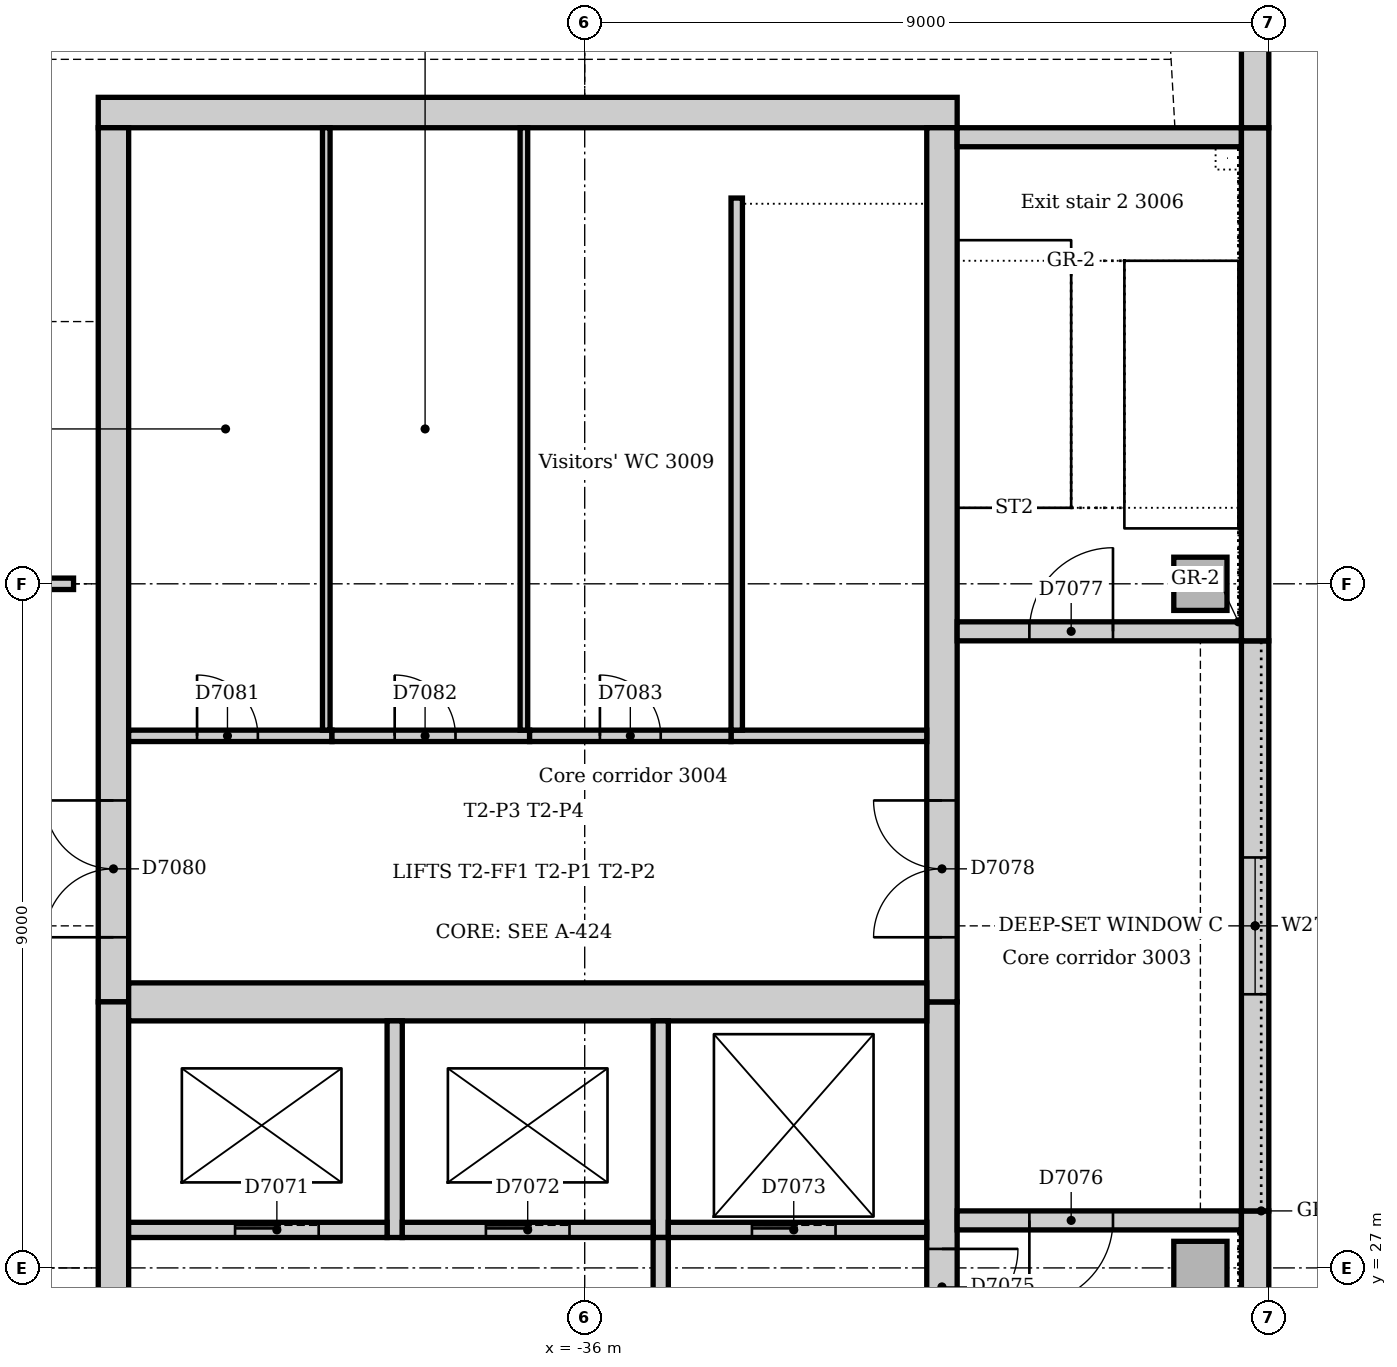
"""IFC4 building model, lengths in metres.
Left out: names, types, materials, properties, quantities, classifications, styles, units other than length and angle.
Written with IfcOpenShell. Run it as: python <this file> out.ifc"""

import sys

from ifc_helpers import new_model, si_unit, direction, frame, frame_2d, origin, origin_2d, place, context, subcontext, project, spatial, rectangle, extrude, element, fill, save


model = new_model("IFC4")
c1 = context("Model", 3, precision=1e-05, world=origin(), true_north=direction((0.0, 1.0)))
c2 = subcontext(c1, "Body", "Model", "MODEL_VIEW")
j1 = project(units=[si_unit("LENGTHUNIT", "METRE"), si_unit("PLANEANGLEUNIT", "RADIAN")], contexts=[c1])
p1 = place(None, origin())
s1 = spatial("IfcSite", under=j1, at=p1, CompositionType="ELEMENT")
p2 = place(p1, origin())
s2 = spatial("IfcBuilding", under=s1, at=p2, CompositionType="ELEMENT")
p3 = place(p2, frame((0.0, 0.0, 128.0)))
s3 = spatial("IfcBuildingStorey", under=s2, at=p3, CompositionType="ELEMENT", Elevation=128.0)
p4 = place(p3, frame((-31.1, 42.2, 0.0), z_axis=(0.0, 0.0, 1.0), x_axis=(-1.0, 0.0, 0.0)))
e1 = element("IfcWall", 1, at=p4, inside=s3, PredefinedType="SOLIDWALL", context=c2, shape_type="SweptSolid", body=[
    extrude(rectangle(XDim=11.3, YDim=0.4, at=frame_2d((5.65, 0.0))), origin(), (0.0, 0.0, 1.0), 4.0),
])
p5 = place(p3, frame((-31.3, 21.0, 0.0), z_axis=(0.0, 0.0, 1.0), x_axis=(0.0, 1.0, 0.0)))
e2 = element("IfcWall", 2, at=p5, inside=s3, PredefinedType="SOLIDWALL", context=c2, shape_type="SweptSolid", body=[
    extrude(rectangle(XDim=9.5, YDim=0.4, at=frame_2d((4.75, 0.0))), origin(), (0.0, 0.0, 1.0), 4.0),
])
p6 = place(p5, frame((5.25, 0.0, 0.0)))
e3 = element("IfcOpeningElement", 3, at=p6, cuts=e2, PredefinedType="OPENING", context=c2, shape_type="SweptSolid", body=[
    extrude(rectangle(XDim=1.0, YDim=2.1, at=frame_2d((0.5, 1.05))), frame((0.0, 0.21, 0.0), z_axis=(0.0, -1.0, 0.0), x_axis=(1.0, 0.0, 0.0)), (0.0, 0.0, 1.0), 0.42),
])
p7 = place(p3, frame((-31.3, 30.5, 0.0), z_axis=(0.0, 0.0, 1.0), x_axis=(0.0, 1.0, 0.0)))
e4 = element("IfcWall", 4, at=p7, inside=s3, PredefinedType="SOLIDWALL", context=c2, shape_type="SweptSolid", body=[
    extrude(rectangle(XDim=11.5, YDim=0.4, at=frame_2d((5.75, 0.0))), origin(), (0.0, 0.0, 1.0), 4.0),
])
p8 = place(p7, frame((0.85, 0.0, 0.0)))
e5 = element("IfcOpeningElement", 5, at=p8, cuts=e4, PredefinedType="OPENING", context=c2, shape_type="SweptSolid", body=[
    extrude(rectangle(XDim=1.8, YDim=2.1, at=frame_2d((0.9, 1.05))), frame((0.0, 0.21, 0.0), z_axis=(0.0, -1.0, 0.0), x_axis=(1.0, 0.0, 0.0)), (0.0, 0.0, 1.0), 0.42),
])
p9 = place(p3, frame((-42.2, 42.0, 0.0), z_axis=(0.0, 0.0, 1.0), x_axis=(0.0, -1.0, 0.0)))
e6 = element("IfcWall", 6, at=p9, inside=s3, PredefinedType="SOLIDWALL", context=c2, shape_type="SweptSolid", body=[
    extrude(rectangle(XDim=11.5, YDim=0.4, at=frame_2d((5.75, 0.0))), origin(), (0.0, 0.0, 1.0), 4.0),
])
p10 = place(p9, frame((8.85, 0.0, 0.0)))
e7 = element("IfcOpeningElement", 7, at=p10, cuts=e6, PredefinedType="OPENING", context=c2, shape_type="SweptSolid", body=[
    extrude(rectangle(XDim=1.8, YDim=2.1, at=frame_2d((0.9, 1.05))), frame((0.0, 0.21, 0.0), z_axis=(0.0, -1.0, 0.0), x_axis=(1.0, 0.0, 0.0)), (0.0, 0.0, 1.0), 0.42),
])
p11 = place(p3, frame((-42.2, 30.5, 0.0), z_axis=(0.0, 0.0, 1.0), x_axis=(0.0, -1.0, 0.0)))
e8 = element("IfcWall", 8, at=p11, inside=s3, PredefinedType="SOLIDWALL", context=c2, shape_type="SweptSolid", body=[
    extrude(rectangle(XDim=9.5, YDim=0.4, at=frame_2d((4.75, 0.0))), origin(), (0.0, 0.0, 1.0), 4.0),
])
p12 = place(p11, frame((3.85, 0.0, 0.0)))
e9 = element("IfcOpeningElement", 9, at=p12, cuts=e8, PredefinedType="OPENING", context=c2, shape_type="SweptSolid", body=[
    extrude(rectangle(XDim=1.8, YDim=2.1, at=frame_2d((0.9, 1.05))), frame((0.0, 0.21, 0.0), z_axis=(0.0, -1.0, 0.0), x_axis=(1.0, 0.0, 0.0)), (0.0, 0.0, 1.0), 0.42),
])
p13 = place(p3, frame((-42.0, 30.5, 0.0), z_axis=(0.0, 0.0, 1.0), x_axis=(1.0, 0.0, 0.0)))
e10 = element("IfcWall", 10, at=p13, inside=s3, PredefinedType="SOLIDWALL", context=c2, shape_type="SweptSolid", body=[
    extrude(rectangle(XDim=10.5, YDim=0.5, at=frame_2d((5.25, 0.0))), origin(), (0.0, 0.0, 1.0), 4.0),
])
p14 = place(p3, frame((-27.36, 27.625, 0.0), z_axis=(0.0, 0.0, 1.0), x_axis=(-1.0, 0.0, 0.0)))
e11 = element("IfcWall", 11, at=p14, inside=s3, PredefinedType="SOLIDWALL", context=c2, shape_type="SweptSolid", body=[
    extrude(rectangle(XDim=3.74, YDim=0.25, at=frame_2d((1.87, 0.0))), origin(), (0.0, 0.0, 1.0), 4.0),
])
p15 = place(p14, frame((1.69, 0.0, 0.0)))
e12 = element("IfcOpeningElement", 12, at=p15, cuts=e11, PredefinedType="OPENING", context=c2, shape_type="SweptSolid", body=[
    extrude(rectangle(XDim=1.1, YDim=2.1, at=frame_2d((0.55, 1.05))), frame((0.0, 0.135, 0.0), z_axis=(0.0, -1.0, 0.0), x_axis=(1.0, 0.0, 0.0)), (0.0, 0.0, 1.0), 0.27),
])
p16 = place(p3, frame((-31.1, 35.375, 0.0), z_axis=(0.0, 0.0, 1.0), x_axis=(1.0, 0.0, 0.0)))
e13 = element("IfcWall", 13, at=p16, inside=s3, PredefinedType="SOLIDWALL", context=c2, shape_type="SweptSolid", body=[
    extrude(rectangle(XDim=3.74, YDim=0.25, at=frame_2d((1.87, 0.0))), origin(), (0.0, 0.0, 1.0), 4.0),
])
p17 = place(p16, frame((0.95, 0.0, 0.0)))
e14 = element("IfcOpeningElement", 14, at=p17, cuts=e13, PredefinedType="OPENING", context=c2, shape_type="SweptSolid", body=[
    extrude(rectangle(XDim=1.1, YDim=2.1, at=frame_2d((0.55, 1.05))), frame((0.0, 0.135, 0.0), z_axis=(0.0, -1.0, 0.0), x_axis=(1.0, 0.0, 0.0)), (0.0, 0.0, 1.0), 0.27),
])
p18 = place(p3, frame((-27.36, 41.875, 0.0), z_axis=(0.0, 0.0, 1.0), x_axis=(-1.0, 0.0, 0.0)))
e15 = element("IfcWall", 15, at=p18, inside=s3, PredefinedType="SOLIDWALL", context=c2, shape_type="SweptSolid", body=[
    extrude(rectangle(XDim=3.74, YDim=0.25, at=frame_2d((1.87, 0.0))), origin(), (0.0, 0.0, 1.0), 4.0),
])
for number, where, z_axis, x_axis in (
    (16, (-27.9, 27.0, 0.0), (0.0, 0.0, 1.0), (1.0, 0.0, 0.0)),
    (17, (-27.9, 36.0, 0.0), (0.0, 0.0, 1.0), (1.0, 0.0, 0.0)),
):
    element("IfcColumn", number, at=place(p3, frame(where, z_axis=z_axis, x_axis=x_axis)), inside=s3, PredefinedType="COLUMN", context=c2, shape_type="SweptSolid", body=[
        extrude(rectangle(XDim=0.7, YDim=0.7, at=origin_2d()), origin(), (0.0, 0.0, 1.0), 4.0),
    ])
p19 = place(p3, frame((-27.18, 21.0, 0.0), z_axis=(0.0, 0.0, 1.0), x_axis=(0.0, 1.0, 0.0)))
e18 = element("IfcWall", 18, at=p19, inside=s3, PredefinedType="STANDARD", context=c2, shape_type="SweptSolid", body=[
    extrude(rectangle(XDim=6.75, YDim=0.36, at=frame_2d((3.375, 0.0))), origin(), (0.0, 0.0, 1.0), 3.85),
])
p20 = place(p3, frame((-27.18, 27.75, 0.0), z_axis=(0.0, 0.0, 1.0), x_axis=(0.0, 1.0, 0.0)))
e19 = element("IfcWall", 19, at=p20, inside=s3, PredefinedType="STANDARD", context=c2, shape_type="SweptSolid", body=[
    extrude(rectangle(XDim=7.5, YDim=0.36, at=frame_2d((3.75, 0.0))), origin(), (0.0, 0.0, 1.0), 3.85),
])
p21 = place(p20, frame((2.85, 0.0, 1.2)))
e20 = element("IfcOpeningElement", 20, at=p21, cuts=e19, PredefinedType="OPENING", context=c2, shape_type="SweptSolid", body=[
    extrude(rectangle(XDim=1.8, YDim=1.2, at=frame_2d((0.9, 0.6))), frame((0.0, 0.19, 0.0), z_axis=(0.0, -1.0, 0.0), x_axis=(1.0, 0.0, 0.0)), (0.0, 0.0, 1.0), 0.38),
])
p22 = place(p3, frame((-27.18, 35.25, 0.0), z_axis=(0.0, 0.0, 1.0), x_axis=(0.0, 1.0, 0.0)))
e21 = element("IfcWall", 21, at=p22, inside=s3, PredefinedType="STANDARD", context=c2, shape_type="SweptSolid", body=[
    extrude(rectangle(XDim=6.75, YDim=0.36, at=frame_2d((3.375, 0.0))), origin(), (0.0, 0.0, 1.0), 3.85),
])
p23 = place(p3, frame((-27.18, 42.0, 0.0), z_axis=(0.0, 0.0, 1.0), x_axis=(0.0, 1.0, 0.0)))
e22 = element("IfcWall", 22, at=p23, inside=s3, PredefinedType="STANDARD", context=c2, shape_type="SweptSolid", body=[
    extrude(rectangle(XDim=3.257, YDim=0.36, at=frame_2d((1.629, 0.0))), origin(), (0.0, 0.0, 1.0), 3.85),
])
p24 = place(p3, frame((-38.5, 27.4, 0.0), z_axis=(0.0, 0.0, 1.0), x_axis=(0.0, 1.0, 0.0)))
e23 = element("IfcWall", 23, at=p24, inside=s3, PredefinedType="SOLIDWALL", context=c2, shape_type="SweptSolid", body=[
    extrude(rectangle(XDim=2.85, YDim=0.2, at=frame_2d((1.425, 0.0))), origin(), (0.0, 0.0, 1.0), 4.0),
])
p25 = place(p3, frame((-42.0, 27.5, 0.0), z_axis=(0.0, 0.0, 1.0), x_axis=(1.0, 0.0, 0.0)))
e24 = element("IfcWall", 24, at=p25, inside=s3, PredefinedType="SOLIDWALL", context=c2, shape_type="SweptSolid", body=[
    extrude(rectangle(XDim=3.4, YDim=0.2, at=frame_2d((1.7, 0.0))), origin(), (0.0, 0.0, 1.0), 4.0),
])
p26 = place(p25, frame((1.4, 0.0, 0.0)))
e25 = element("IfcOpeningElement", 25, at=p26, cuts=e24, PredefinedType="OPENING", context=c2, shape_type="SweptSolid", body=[
    extrude(rectangle(XDim=1.1, YDim=2.1, at=frame_2d((0.55, 1.05))), frame((0.0, 0.11, 0.0), z_axis=(0.0, -1.0, 0.0), x_axis=(1.0, 0.0, 0.0)), (0.0, 0.0, 1.0), 0.22),
])
p27 = place(p3, frame((-35.0, 27.4, 0.0), z_axis=(0.0, 0.0, 1.0), x_axis=(0.0, 1.0, 0.0)))
e26 = element("IfcWall", 26, at=p27, inside=s3, PredefinedType="SOLIDWALL", context=c2, shape_type="SweptSolid", body=[
    extrude(rectangle(XDim=2.85, YDim=0.2, at=frame_2d((1.425, 0.0))), origin(), (0.0, 0.0, 1.0), 4.0),
])
p28 = place(p3, frame((-38.4, 27.5, 0.0), z_axis=(0.0, 0.0, 1.0), x_axis=(1.0, 0.0, 0.0)))
e27 = element("IfcWall", 27, at=p28, inside=s3, PredefinedType="SOLIDWALL", context=c2, shape_type="SweptSolid", body=[
    extrude(rectangle(XDim=3.3, YDim=0.2, at=frame_2d((1.65, 0.0))), origin(), (0.0, 0.0, 1.0), 4.0),
])
p29 = place(p28, frame((1.1, 0.0, 0.0)))
e28 = element("IfcOpeningElement", 28, at=p29, cuts=e27, PredefinedType="OPENING", context=c2, shape_type="SweptSolid", body=[
    extrude(rectangle(XDim=1.1, YDim=2.1, at=frame_2d((0.55, 1.05))), frame((0.0, 0.11, 0.0), z_axis=(0.0, -1.0, 0.0), x_axis=(1.0, 0.0, 0.0)), (0.0, 0.0, 1.0), 0.22),
])
p30 = place(p3, frame((-34.9, 27.5, 0.0), z_axis=(0.0, 0.0, 1.0), x_axis=(1.0, 0.0, 0.0)))
e29 = element("IfcWall", 29, at=p30, inside=s3, PredefinedType="SOLIDWALL", context=c2, shape_type="SweptSolid", body=[
    extrude(rectangle(XDim=3.4, YDim=0.2, at=frame_2d((1.7, 0.0))), origin(), (0.0, 0.0, 1.0), 4.0),
])
p31 = place(p30, frame((1.1, 0.0, 0.0)))
e30 = element("IfcOpeningElement", 30, at=p31, cuts=e29, PredefinedType="OPENING", context=c2, shape_type="SweptSolid", body=[
    extrude(rectangle(XDim=1.1, YDim=2.1, at=frame_2d((0.55, 1.05))), frame((0.0, 0.11, 0.0), z_axis=(0.0, -1.0, 0.0), x_axis=(1.0, 0.0, 0.0)), (0.0, 0.0, 1.0), 0.22),
])
p32 = place(p3, frame((-35.0, 24.1, 0.0), z_axis=(0.0, 0.0, 1.0), x_axis=(0.0, 1.0, 0.0)))
e31 = element("IfcWall", 31, at=p32, inside=s3, PredefinedType="SOLIDWALL", context=c2, shape_type="SweptSolid", body=[
    extrude(rectangle(XDim=3.3, YDim=0.2, at=frame_2d((1.65, 0.0))), origin(), (0.0, 0.0, 1.0), 4.0),
])
p33 = place(p32, frame((1.15, 0.0, 0.0)))
e32 = element("IfcOpeningElement", 32, at=p33, cuts=e31, PredefinedType="OPENING", context=c2, shape_type="SweptSolid", body=[
    extrude(rectangle(XDim=1.0, YDim=2.1, at=frame_2d((0.5, 1.05))), frame((0.0, 0.11, 0.0), z_axis=(0.0, -1.0, 0.0), x_axis=(1.0, 0.0, 0.0)), (0.0, 0.0, 1.0), 0.22),
])
p34 = place(p3, frame((-34.075, 34.0, 0.0), z_axis=(0.0, 0.0, 1.0), x_axis=(1.0, 0.0, 0.0)))
e33 = element("IfcWall", 33, at=p34, inside=s3, PredefinedType="SOLIDWALL", context=c2, shape_type="SweptSolid", body=[
    extrude(rectangle(XDim=2.575, YDim=0.15, at=frame_2d((1.288, 0.0))), origin(), (0.0, 0.0, 1.0), 4.0),
])
p35 = place(p3, frame((-34.0, 41.075, 0.0), z_axis=(0.0, 0.0, 1.0), x_axis=(0.0, -1.0, 0.0)))
e34 = element("IfcWall", 34, at=p35, inside=s3, PredefinedType="SOLIDWALL", context=c2, shape_type="SweptSolid", body=[
    extrude(rectangle(XDim=7.0, YDim=0.15, at=frame_2d((3.5, 0.0))), origin(), (0.0, 0.0, 1.0), 4.0),
])
p36 = place(p3, frame((-39.325, 34.0, 0.0), z_axis=(0.0, 0.0, 1.0), x_axis=(-1.0, 0.0, 0.0)))
e35 = element("IfcWall", 35, at=p36, inside=s3, PredefinedType="PARTITIONING", context=c2, shape_type="SweptSolid", body=[
    extrude(rectangle(XDim=2.675, YDim=0.15, at=frame_2d((1.337, 0.0))), origin(), (0.0, 0.0, 1.0), 3.85),
])
p37 = place(p36, frame((0.975, 0.0, 0.0)))
e36 = element("IfcOpeningElement", 36, at=p37, cuts=e35, PredefinedType="OPENING", context=c2, shape_type="SweptSolid", body=[
    extrude(rectangle(XDim=0.8, YDim=2.1, at=frame_2d((0.4, 1.05))), frame((0.0, 0.085, 0.0), z_axis=(0.0, -1.0, 0.0), x_axis=(1.0, 0.0, 0.0)), (0.0, 0.0, 1.0), 0.17),
])
p38 = place(p3, frame((-36.725, 34.0, 0.0), z_axis=(0.0, 0.0, 1.0), x_axis=(-1.0, 0.0, 0.0)))
e37 = element("IfcWall", 37, at=p38, inside=s3, PredefinedType="PARTITIONING", context=c2, shape_type="SweptSolid", body=[
    extrude(rectangle(XDim=2.6, YDim=0.15, at=frame_2d((1.3, 0.0))), origin(), (0.0, 0.0, 1.0), 3.85),
])
p39 = place(p38, frame((0.975, 0.0, 0.0)))
e38 = element("IfcOpeningElement", 38, at=p39, cuts=e37, PredefinedType="OPENING", context=c2, shape_type="SweptSolid", body=[
    extrude(rectangle(XDim=0.8, YDim=2.1, at=frame_2d((0.4, 1.05))), frame((0.0, 0.085, 0.0), z_axis=(0.0, -1.0, 0.0), x_axis=(1.0, 0.0, 0.0)), (0.0, 0.0, 1.0), 0.17),
])
p40 = place(p3, frame((-34.075, 34.0, 0.0), z_axis=(0.0, 0.0, 1.0), x_axis=(-1.0, 0.0, 0.0)))
e39 = element("IfcWall", 39, at=p40, inside=s3, PredefinedType="PARTITIONING", context=c2, shape_type="SweptSolid", body=[
    extrude(rectangle(XDim=2.65, YDim=0.15, at=frame_2d((1.325, 0.0))), origin(), (0.0, 0.0, 1.0), 3.85),
])
p41 = place(p40, frame((0.925, 0.0, 0.0)))
e40 = element("IfcOpeningElement", 40, at=p41, cuts=e39, PredefinedType="OPENING", context=c2, shape_type="SweptSolid", body=[
    extrude(rectangle(XDim=0.8, YDim=2.1, at=frame_2d((0.4, 1.05))), frame((0.0, 0.085, 0.0), z_axis=(0.0, -1.0, 0.0), x_axis=(1.0, 0.0, 0.0)), (0.0, 0.0, 1.0), 0.17),
])
for number, where, z_axis, x_axis in (
    (41, (-39.4, 34.075, 0.0), (0.0, 0.0, 1.0), (0.0, 1.0, 0.0)),
    (42, (-36.8, 34.075, 0.0), (0.0, 0.0, 1.0), (0.0, 1.0, 0.0)),
):
    element("IfcWall", number, at=place(p3, frame(where, z_axis=z_axis, x_axis=x_axis)), inside=s3, PredefinedType="PARTITIONING", context=c2, shape_type="SweptSolid", body=[
        extrude(rectangle(XDim=7.925, YDim=0.1, at=frame_2d((3.962, 0.0))), origin(), (0.0, 0.0, 1.0), 3.85),
    ])
p42 = place(p3, frame((-44.7, 36.0, 0.0), z_axis=(0.0, 0.0, 1.0), x_axis=(1.0, 0.0, 0.0)))
e43 = element("IfcWall", 43, at=p42, inside=s3, PredefinedType="PARTITIONING", context=c2, shape_type="SweptSolid", body=[
    extrude(rectangle(XDim=1.975, YDim=0.15, at=frame_2d((0.988, 0.0))), origin(), (0.0, 0.0, 1.0), 3.602),
])
p43 = place(p42, frame((0.55, 0.0, 0.0)))
e44 = element("IfcOpeningElement", 44, at=p43, cuts=e43, PredefinedType="OPENING", context=c2, shape_type="SweptSolid", body=[
    extrude(rectangle(XDim=0.9, YDim=2.1, at=frame_2d((0.45, 1.05))), frame((0.0, 0.085, 0.0), z_axis=(0.0, -1.0, 0.0), x_axis=(1.0, 0.0, 0.0)), (0.0, 0.0, 1.0), 0.17),
])
p44 = place(p21, origin())
e45 = element("IfcWindow", 45, at=p44, inside=s3, PartitioningType="SINGLE_PANEL", PredefinedType="WINDOW", context=c2, shape_type="SweptSolid", body=[
    extrude(rectangle(XDim=1.8, YDim=1.2, at=frame_2d((0.9, 0.6))), frame((0.0, 0.13, 0.0), z_axis=(0.0, -1.0, 0.0), x_axis=(1.0, 0.0, 0.0)), (0.0, 0.0, 1.0), 0.06),
])
fill(e20, e45)
p45 = place(p26, origin())
e46 = element("IfcDoor", 46, at=p45, inside=s3, OperationType="SLIDING_TO_LEFT", PredefinedType="DOOR", context=c2, shape_type="SweptSolid", body=[
    extrude(rectangle(XDim=1.1, YDim=2.1, at=frame_2d((0.55, 1.05))), frame((0.0, 0.025, 0.0), z_axis=(0.0, -1.0, 0.0), x_axis=(1.0, 0.0, 0.0)), (0.0, 0.0, 1.0), 0.05),
])
fill(e25, e46)
p46 = place(p29, origin())
e47 = element("IfcDoor", 47, at=p46, inside=s3, OperationType="SLIDING_TO_LEFT", PredefinedType="DOOR", context=c2, shape_type="SweptSolid", body=[
    extrude(rectangle(XDim=1.1, YDim=2.1, at=frame_2d((0.55, 1.05))), frame((0.0, 0.025, 0.0), z_axis=(0.0, -1.0, 0.0), x_axis=(1.0, 0.0, 0.0)), (0.0, 0.0, 1.0), 0.05),
])
fill(e28, e47)
p47 = place(p31, origin())
e48 = element("IfcDoor", 48, at=p47, inside=s3, OperationType="SLIDING_TO_LEFT", PredefinedType="DOOR", context=c2, shape_type="SweptSolid", body=[
    extrude(rectangle(XDim=1.1, YDim=2.1, at=frame_2d((0.55, 1.05))), frame((0.0, 0.025, 0.0), z_axis=(0.0, -1.0, 0.0), x_axis=(1.0, 0.0, 0.0)), (0.0, 0.0, 1.0), 0.05),
])
fill(e30, e48)
p48 = place(p6, frame((1.0, 0.0, 0.0), z_axis=(0.0, 0.0, 1.0), x_axis=(-1.0, 0.0, 0.0)))
e49 = element("IfcDoor", 49, at=p48, inside=s3, OperationType="SINGLE_SWING_LEFT", PredefinedType="DOOR", context=c2, shape_type="SweptSolid", body=[
    extrude(rectangle(XDim=1.0, YDim=2.1, at=frame_2d((0.5, 1.05))), frame((0.0, 0.025, 0.0), z_axis=(0.0, -1.0, 0.0), x_axis=(1.0, 0.0, 0.0)), (0.0, 0.0, 1.0), 0.05),
])
fill(e3, e49)
p49 = place(p15, origin())
e50 = element("IfcDoor", 50, at=p49, inside=s3, OperationType="SINGLE_SWING_RIGHT", PredefinedType="DOOR", context=c2, shape_type="SweptSolid", body=[
    extrude(rectangle(XDim=1.1, YDim=2.1, at=frame_2d((0.55, 1.05))), frame((0.0, 0.025, 0.0), z_axis=(0.0, -1.0, 0.0), x_axis=(1.0, 0.0, 0.0)), (0.0, 0.0, 1.0), 0.05),
])
fill(e12, e50)
p50 = place(p17, origin())
e51 = element("IfcDoor", 51, at=p50, inside=s3, OperationType="SINGLE_SWING_RIGHT", PredefinedType="DOOR", context=c2, shape_type="SweptSolid", body=[
    extrude(rectangle(XDim=1.1, YDim=2.1, at=frame_2d((0.55, 1.05))), frame((0.0, 0.025, 0.0), z_axis=(0.0, -1.0, 0.0), x_axis=(1.0, 0.0, 0.0)), (0.0, 0.0, 1.0), 0.05),
])
fill(e14, e51)
p51 = place(p8, origin())
e52 = element("IfcDoor", 52, at=p51, inside=s3, OperationType="DOUBLE_DOOR_SINGLE_SWING", PredefinedType="DOOR", context=c2, shape_type="SweptSolid", body=[
    extrude(rectangle(XDim=1.8, YDim=2.1, at=frame_2d((0.9, 1.05))), frame((0.0, 0.025, 0.0), z_axis=(0.0, -1.0, 0.0), x_axis=(1.0, 0.0, 0.0)), (0.0, 0.0, 1.0), 0.05),
])
fill(e5, e52)
p52 = place(p10, frame((1.8, 0.0, 0.0), z_axis=(0.0, 0.0, 1.0), x_axis=(-1.0, 0.0, 0.0)))
e53 = element("IfcDoor", 53, at=p52, inside=s3, OperationType="DOUBLE_DOOR_SINGLE_SWING", PredefinedType="DOOR", context=c2, shape_type="SweptSolid", body=[
    extrude(rectangle(XDim=1.8, YDim=2.1, at=frame_2d((0.9, 1.05))), frame((0.0, 0.025, 0.0), z_axis=(0.0, -1.0, 0.0), x_axis=(1.0, 0.0, 0.0)), (0.0, 0.0, 1.0), 0.05),
])
fill(e7, e53)
p53 = place(p37, frame((0.8, 0.0, 0.0), z_axis=(0.0, 0.0, 1.0), x_axis=(-1.0, 0.0, 0.0)))
e54 = element("IfcDoor", 54, at=p53, inside=s3, OperationType="SINGLE_SWING_LEFT", PredefinedType="DOOR", context=c2, shape_type="SweptSolid", body=[
    extrude(rectangle(XDim=0.8, YDim=2.1, at=frame_2d((0.4, 1.05))), frame((0.0, 0.025, 0.0), z_axis=(0.0, -1.0, 0.0), x_axis=(1.0, 0.0, 0.0)), (0.0, 0.0, 1.0), 0.05),
])
fill(e36, e54)
p54 = place(p39, frame((0.8, 0.0, 0.0), z_axis=(0.0, 0.0, 1.0), x_axis=(-1.0, 0.0, 0.0)))
e55 = element("IfcDoor", 55, at=p54, inside=s3, OperationType="SINGLE_SWING_LEFT", PredefinedType="DOOR", context=c2, shape_type="SweptSolid", body=[
    extrude(rectangle(XDim=0.8, YDim=2.1, at=frame_2d((0.4, 1.05))), frame((0.0, 0.025, 0.0), z_axis=(0.0, -1.0, 0.0), x_axis=(1.0, 0.0, 0.0)), (0.0, 0.0, 1.0), 0.05),
])
fill(e38, e55)
p55 = place(p41, frame((0.8, 0.0, 0.0), z_axis=(0.0, 0.0, 1.0), x_axis=(-1.0, 0.0, 0.0)))
e56 = element("IfcDoor", 56, at=p55, inside=s3, OperationType="SINGLE_SWING_LEFT", PredefinedType="DOOR", context=c2, shape_type="SweptSolid", body=[
    extrude(rectangle(XDim=0.8, YDim=2.1, at=frame_2d((0.4, 1.05))), frame((0.0, 0.025, 0.0), z_axis=(0.0, -1.0, 0.0), x_axis=(1.0, 0.0, 0.0)), (0.0, 0.0, 1.0), 0.05),
])
fill(e40, e56)
save(model, sys.argv[1])
